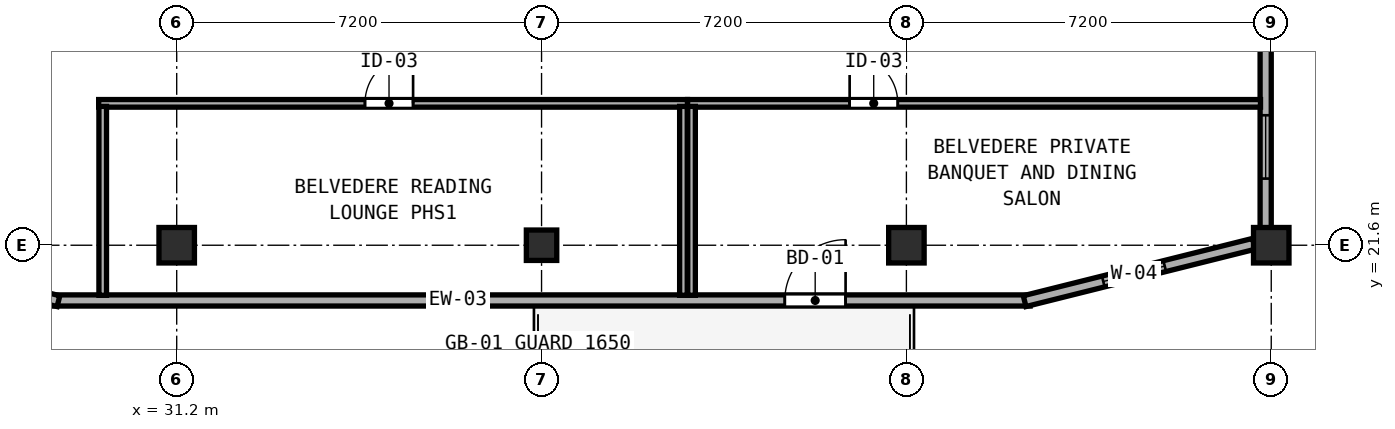
"""IFC4 building model, lengths in metres.
Left out: names, types, materials, properties, quantities, classifications, styles, units other than length and angle.
Written with IfcOpenShell. Run it as: python <this file> out.ifc"""

import sys

from ifc_helpers import new_model, si_unit, direction, frame, frame_2d, origin, origin_2d, place, context, subcontext, project, spatial, rectangle, hollow_rectangle, extrude, element, fill, save


model = new_model("IFC4")
c1 = context("Model", 3, precision=1e-05, world=origin(), true_north=direction((0.0, 1.0)))
c2 = subcontext(c1, "Body", "Model", "MODEL_VIEW")
j1 = project(units=[si_unit("LENGTHUNIT", "METRE"), si_unit("PLANEANGLEUNIT", "RADIAN")], contexts=[c1])
p1 = place(None, origin())
s1 = spatial("IfcSite", under=j1, at=p1, CompositionType="ELEMENT")
p2 = place(p1, origin())
s2 = spatial("IfcBuilding", under=s1, at=p2, CompositionType="ELEMENT")
p3 = place(p2, frame((0.0, 0.0, 305.6)))
s3 = spatial("IfcBuildingStorey", under=s2, at=p3, CompositionType="ELEMENT", Elevation=305.6)
for number, where, z_axis, x_axis in (
    (1, (52.8, 21.6, 0.0), (0.0, 0.0, 1.0), (1.0, 0.0, 0.0)),
    (2, (31.2, 21.6, 0.0), (0.0, 0.0, 1.0), (1.0, 0.0, 0.0)),
    (3, (45.6, 21.6, 0.0), (0.0, 0.0, 1.0), (1.0, 0.0, 0.0)),
):
    element("IfcColumn", number, at=place(p3, frame(where, z_axis=z_axis, x_axis=x_axis)), inside=s3, PredefinedType="COLUMN", context=c2, shape_type="SweptSolid", body=[
        extrude(hollow_rectangle(XDim=0.7, YDim=0.7, WallThickness=0.026, at=origin_2d()), origin(), (0.0, 0.0, 1.0), 3.9),
    ])
p4 = place(p3, frame((38.4, 21.6, 0.0), z_axis=(0.0, 0.0, 1.0), x_axis=(1.0, 0.0, 0.0)))
e4 = element("IfcColumn", 4, at=p4, inside=s3, PredefinedType="COLUMN", context=c2, shape_type="SweptSolid", body=[
    extrude(hollow_rectangle(XDim=0.6, YDim=0.6, WallThickness=0.024, at=origin_2d()), origin(), (0.0, 0.0, 1.0), 3.9),
])
p5 = place(p3, frame((28.759, 20.51, 0.0), z_axis=(0.0, 0.0, 1.0), x_axis=(1.0, 0.0, 0.0)))
e5 = element("IfcWall", 5, at=p5, inside=s3, PredefinedType="SOLIDWALL", context=c2, shape_type="SweptSolid", body=[
    extrude(rectangle(XDim=19.283, YDim=0.22, at=frame_2d((9.642, 0.0))), origin(), (0.0, 0.0, 1.0), 3.72),
])
p6 = place(p5, frame((15.641, 0.0, 0.0), z_axis=(0.0, 0.0, 1.0), x_axis=(-1.0, 0.0, 0.0)))
e6 = element("IfcOpeningElement", 6, at=p6, cuts=e5, PredefinedType="OPENING", context=c2, shape_type="SweptSolid", body=[
    extrude(rectangle(XDim=1.2, YDim=2.15, at=frame_2d((0.6, 1.075))), frame((0.0, 0.12, 0.0), z_axis=(0.0, -1.0, 0.0), x_axis=(1.0, 0.0, 0.0)), (0.0, 0.0, 1.0), 0.24),
])
p7 = place(p3, frame((47.933, 20.497, 0.0), z_axis=(0.0, 0.0, 1.0), x_axis=(0.970136341762, 0.242560257242, 0.0)))
e7 = element("IfcWall", 7, at=p7, inside=s3, PredefinedType="SOLIDWALL", context=c2, shape_type="SweptSolid", body=[
    extrude(rectangle(XDim=4.664, YDim=0.22, at=frame_2d((2.332, 0.0))), origin(), (0.0, 0.0, 1.0), 3.365),
])
p8 = place(p7, frame((1.6, 0.0, 0.85)))
e8 = element("IfcOpeningElement", 8, at=p8, cuts=e7, PredefinedType="OPENING", context=c2, shape_type="SweptSolid", body=[
    extrude(rectangle(XDim=1.25, YDim=1.95, at=frame_2d((0.625, 0.975))), frame((0.0, 0.12, 0.0), z_axis=(0.0, -1.0, 0.0), x_axis=(1.0, 0.0, 0.0)), (0.0, 0.0, 1.0), 0.24),
])
p9 = place(p3, frame((52.69, 21.942, 0.0), z_axis=(0.0, 0.0, 1.0), x_axis=(0.0, 1.0, 0.0)))
e9 = element("IfcWall", 9, at=p9, inside=s3, PredefinedType="SOLIDWALL", context=c2, shape_type="SweptSolid", body=[
    extrude(rectangle(XDim=5.366, YDim=0.22, at=frame_2d((2.683, 0.0))), origin(), (0.0, 0.0, 1.0), 3.365),
])
p10 = place(p9, frame((0.973, 0.0, 0.85)))
e10 = element("IfcOpeningElement", 10, at=p10, cuts=e9, PredefinedType="OPENING", context=c2, shape_type="SweptSolid", body=[
    extrude(rectangle(XDim=1.25, YDim=1.95, at=frame_2d((0.625, 0.975))), frame((0.0, 0.12, 0.0), z_axis=(0.0, -1.0, 0.0), x_axis=(1.0, 0.0, 0.0)), (0.0, 0.0, 1.0), 0.24),
])
p11 = place(p3, frame((24.342, 21.628, 0.0), z_axis=(0.0, 0.0, 1.0), x_axis=(0.970136341762, -0.242560257242, 0.0)))
e11 = element("IfcWall", 11, at=p11, inside=s3, PredefinedType="SOLIDWALL", context=c2, shape_type="SweptSolid", body=[
    extrude(rectangle(XDim=4.664, YDim=0.22, at=frame_2d((2.332, 0.0))), origin(), (0.0, 0.0, 1.0), 3.365),
])
p12 = place(p11, frame((1.6, 0.0, 0.85)))
e12 = element("IfcOpeningElement", 12, at=p12, cuts=e11, PredefinedType="OPENING", context=c2, shape_type="SweptSolid", body=[
    extrude(rectangle(XDim=1.25, YDim=1.95, at=frame_2d((0.625, 0.975))), frame((0.0, 0.12, 0.0), z_axis=(0.0, -1.0, 0.0), x_axis=(1.0, 0.0, 0.0)), (0.0, 0.0, 1.0), 0.24),
])
p13 = place(p3, frame((29.66, 24.4, 0.0), z_axis=(0.0, 0.0, 1.0), x_axis=(1.0, 0.0, 0.0)))
e13 = element("IfcWall", 13, at=p13, inside=s3, PredefinedType="PARTITIONING", context=c2, shape_type="SweptSolid", body=[
    extrude(rectangle(XDim=11.62, YDim=0.15, at=frame_2d((5.81, 0.0))), origin(), (0.0, 0.0, 1.0), 3.72),
])
p14 = place(p13, frame((6.205, 0.0, 0.0), z_axis=(0.0, 0.0, 1.0), x_axis=(-1.0, 0.0, 0.0)))
e14 = element("IfcOpeningElement", 14, at=p14, cuts=e13, PredefinedType="OPENING", context=c2, shape_type="SweptSolid", body=[
    extrude(rectangle(XDim=0.95, YDim=2.12, at=frame_2d((0.475, 1.06))), frame((0.0, 0.085, 0.0), z_axis=(0.0, -1.0, 0.0), x_axis=(1.0, 0.0, 0.0)), (0.0, 0.0, 1.0), 0.17),
])
for number, where, z_axis, x_axis in (
    (15, (29.74, 20.612, 0.0), (0.0, 0.0, 1.0), (0.0, 1.0, 0.0)),
    (16, (41.2, 20.612, 0.0), (0.0, 0.0, 1.0), (0.0, 1.0, 0.0)),
):
    element("IfcWall", number, at=place(p3, frame(where, z_axis=z_axis, x_axis=x_axis)), inside=s3, PredefinedType="PARTITIONING", context=c2, shape_type="SweptSolid", body=[
        extrude(rectangle(XDim=3.728, YDim=0.15, at=frame_2d((1.864, 0.0))), origin(), (0.0, 0.0, 1.0), 3.72),
    ])
p15 = place(p3, frame((41.282, 24.4, 0.0), z_axis=(0.0, 0.0, 1.0), x_axis=(1.0, 0.0, 0.0)))
e17 = element("IfcWall", 17, at=p15, inside=s3, PredefinedType="PARTITIONING", context=c2, shape_type="SweptSolid", body=[
    extrude(rectangle(XDim=11.306, YDim=0.15, at=frame_2d((5.653, 0.0))), origin(), (0.0, 0.0, 1.0), 3.72),
])
p16 = place(p15, frame((4.148, 0.0, 0.0), z_axis=(0.0, 0.0, 1.0), x_axis=(-1.0, 0.0, 0.0)))
e18 = element("IfcOpeningElement", 18, at=p16, cuts=e17, PredefinedType="OPENING", context=c2, shape_type="SweptSolid", body=[
    extrude(rectangle(XDim=0.95, YDim=2.12, at=frame_2d((0.475, 1.06))), frame((0.0, 0.085, 0.0), z_axis=(0.0, -1.0, 0.0), x_axis=(1.0, 0.0, 0.0)), (0.0, 0.0, 1.0), 0.17),
])
p17 = place(p3, frame((41.36, 20.612, 0.0), z_axis=(0.0, 0.0, 1.0), x_axis=(0.0, 1.0, 0.0)))
e19 = element("IfcWall", 19, at=p17, inside=s3, PredefinedType="PARTITIONING", context=c2, shape_type="SweptSolid", body=[
    extrude(rectangle(XDim=3.728, YDim=0.15, at=frame_2d((1.864, 0.0))), origin(), (0.0, 0.0, 1.0), 3.72),
])
p18 = place(p8, origin())
e20 = element("IfcWindow", 20, at=p18, inside=s3, PartitioningType="SINGLE_PANEL", PredefinedType="WINDOW", context=c2, shape_type="SweptSolid", body=[
    extrude(rectangle(XDim=1.25, YDim=1.95, at=frame_2d((0.625, 0.975))), frame((0.0, 0.03, 0.0), z_axis=(0.0, -1.0, 0.0), x_axis=(1.0, 0.0, 0.0)), (0.0, 0.0, 1.0), 0.06),
])
fill(e8, e20)
p19 = place(p10, origin())
e21 = element("IfcWindow", 21, at=p19, inside=s3, PartitioningType="SINGLE_PANEL", PredefinedType="WINDOW", context=c2, shape_type="SweptSolid", body=[
    extrude(rectangle(XDim=1.25, YDim=1.95, at=frame_2d((0.625, 0.975))), frame((0.0, 0.03, 0.0), z_axis=(0.0, -1.0, 0.0), x_axis=(1.0, 0.0, 0.0)), (0.0, 0.0, 1.0), 0.06),
])
fill(e10, e21)
p20 = place(p6, origin())
e22 = element("IfcDoor", 22, at=p20, inside=s3, OperationType="SINGLE_SWING_LEFT", PredefinedType="DOOR", context=c2, shape_type="SweptSolid", body=[
    extrude(rectangle(XDim=1.2, YDim=2.15, at=frame_2d((0.6, 1.075))), frame((0.0, 0.025, 0.0), z_axis=(0.0, -1.0, 0.0), x_axis=(1.0, 0.0, 0.0)), (0.0, 0.0, 1.0), 0.05),
])
fill(e6, e22)
p21 = place(p14, origin())
e23 = element("IfcDoor", 23, at=p21, inside=s3, OperationType="SINGLE_SWING_LEFT", PredefinedType="DOOR", context=c2, shape_type="SweptSolid", body=[
    extrude(rectangle(XDim=0.95, YDim=2.12, at=frame_2d((0.475, 1.06))), frame((0.0, 0.025, 0.0), z_axis=(0.0, -1.0, 0.0), x_axis=(1.0, 0.0, 0.0)), (0.0, 0.0, 1.0), 0.05),
])
fill(e14, e23)
p22 = place(p16, origin())
e24 = element("IfcDoor", 24, at=p22, inside=s3, OperationType="SINGLE_SWING_RIGHT", PredefinedType="DOOR", context=c2, shape_type="SweptSolid", body=[
    extrude(rectangle(XDim=0.95, YDim=2.12, at=frame_2d((0.475, 1.06))), frame((0.0, 0.025, 0.0), z_axis=(0.0, -1.0, 0.0), x_axis=(1.0, 0.0, 0.0)), (0.0, 0.0, 1.0), 0.05),
])
fill(e18, e24)
save(model, sys.argv[1])
